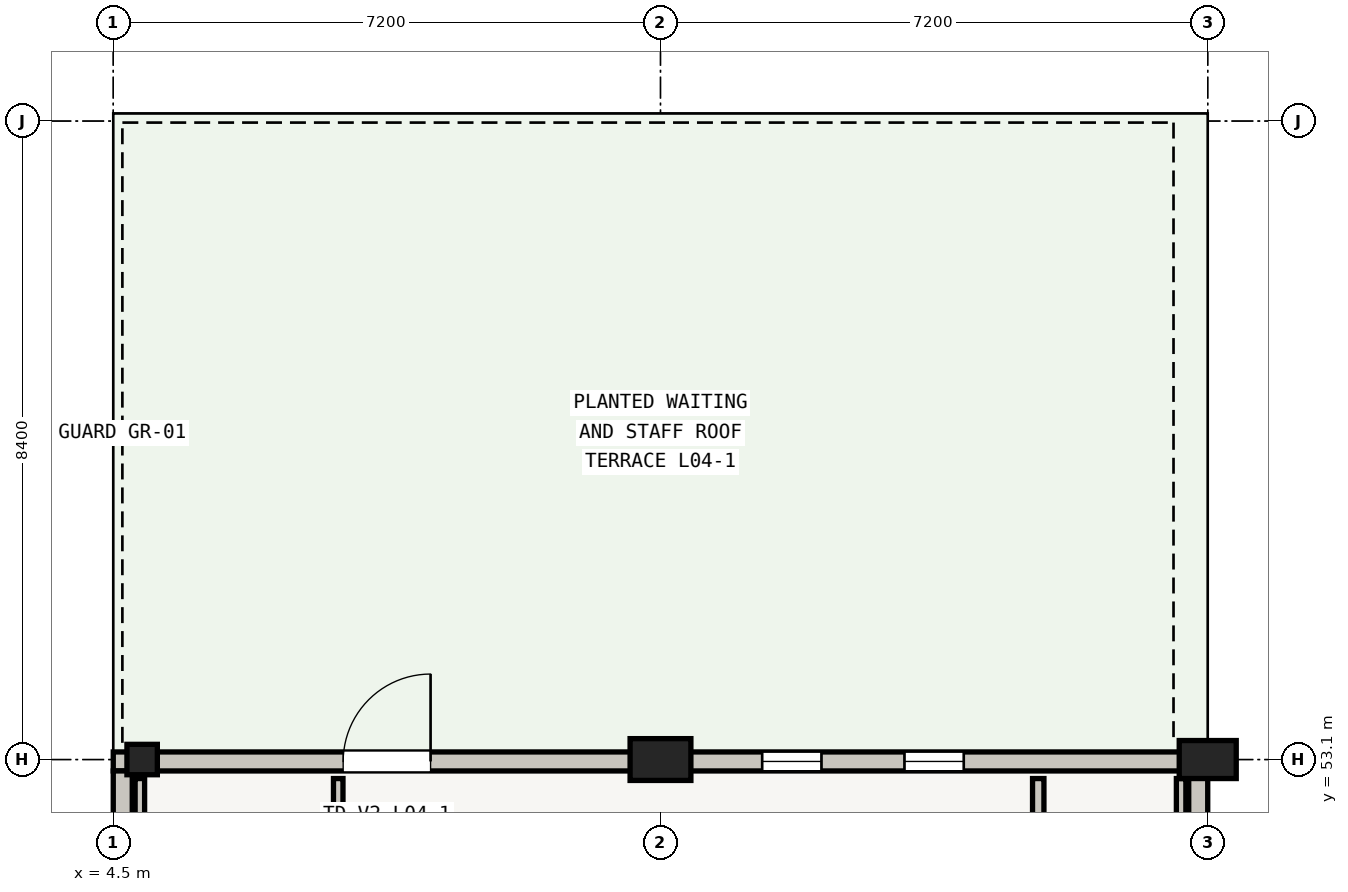
"""IFC4 building model, lengths in metres.
Left out: names, types, materials, properties, quantities, classifications, styles, units other than length and angle.
Written with IfcOpenShell. Run it as: python <this file> out.ifc"""

import sys

from ifc_helpers import new_model, si_unit, direction, frame, frame_2d, origin, origin_2d, place, context, subcontext, project, spatial, rectangle, extrude, element, fill, save


model = new_model("IFC4")
c1 = context("Model", 3, precision=1e-05, world=origin(), true_north=direction((0.0, 1.0)))
c2 = subcontext(c1, "Body", "Model", "MODEL_VIEW")
j1 = project(units=[si_unit("LENGTHUNIT", "METRE"), si_unit("PLANEANGLEUNIT", "RADIAN")], contexts=[c1])
p1 = place(None, origin())
s1 = spatial("IfcSite", under=j1, at=p1, CompositionType="ELEMENT")
p2 = place(p1, origin())
s2 = spatial("IfcBuilding", under=s1, at=p2, CompositionType="ELEMENT")
p3 = place(p2, frame((0.0, 0.0, 17.1)))
s3 = spatial("IfcBuildingStorey", under=s2, at=p3, CompositionType="ELEMENT", Elevation=17.1)
p4 = place(p3, frame((4.88, 53.1, 0.0), z_axis=(0.0, 0.0, 1.0), x_axis=(1.0, 0.0, 0.0)))
e1 = element("IfcColumn", 1, at=p4, inside=s3, PredefinedType="COLUMN", context=c2, shape_type="SweptSolid", body=[
    extrude(rectangle(XDim=0.4, YDim=0.4, at=origin_2d()), origin(), (0.0, 0.0, 1.0), 3.77),
])
p5 = place(p3, frame((11.7, 53.1, 0.0), z_axis=(0.0, 0.0, 1.0), x_axis=(1.0, 0.0, 0.0)))
e2 = element("IfcColumn", 2, at=p5, inside=s3, PredefinedType="COLUMN", context=c2, shape_type="SweptSolid", body=[
    extrude(rectangle(XDim=0.8, YDim=0.55, at=origin_2d()), origin(), (0.0, 0.0, 1.0), 3.77),
])
p6 = place(p3, frame((18.9, 53.1, 0.0), z_axis=(0.0, 0.0, 1.0), x_axis=(1.0, 0.0, 0.0)))
e3 = element("IfcColumn", 3, at=p6, inside=s3, PredefinedType="COLUMN", context=c2, shape_type="SweptSolid", body=[
    extrude(rectangle(XDim=0.75, YDim=0.5, at=origin_2d()), origin(), (0.0, 0.0, 1.0), 3.77),
])
p7 = place(p3, frame((4.5, 53.075, 0.0), z_axis=(0.0, 0.0, 1.0), x_axis=(1.0, 0.0, 0.0)))
e4 = element("IfcWall", 4, at=p7, inside=s3, PredefinedType="STANDARD", context=c2, shape_type="SweptSolid", body=[
    extrude(rectangle(XDim=7.2, YDim=0.25, at=frame_2d((3.6, 0.0))), origin(), (0.0, 0.0, 1.0), 2.955),
])
p8 = place(p7, frame((3.025, 0.0, 0.19)))
e5 = element("IfcOpeningElement", 5, at=p8, cuts=e4, PredefinedType="OPENING", context=c2, shape_type="SweptSolid", body=[
    extrude(rectangle(XDim=1.15, YDim=2.02, at=frame_2d((0.575, 1.01))), frame((0.0, 0.125, 0.0), z_axis=(0.0, -1.0, 0.0), x_axis=(1.0, 0.0, 0.0)), (0.0, 0.0, 1.0), 0.25),
])
p9 = place(p3, frame((11.7, 53.075, 0.0), z_axis=(0.0, 0.0, 1.0), x_axis=(1.0, 0.0, 0.0)))
e6 = element("IfcWall", 6, at=p9, inside=s3, PredefinedType="STANDARD", context=c2, shape_type="SweptSolid", body=[
    extrude(rectangle(XDim=7.2, YDim=0.25, at=frame_2d((3.6, 0.0))), origin(), (0.0, 0.0, 1.0), 2.955),
])
p10 = place(p9, frame((1.338, 0.0, 0.6)))
e7 = element("IfcOpeningElement", 7, at=p10, cuts=e6, PredefinedType="OPENING", context=c2, shape_type="SweptSolid", body=[
    extrude(rectangle(XDim=0.78, YDim=1.95, at=frame_2d((0.39, 0.975))), frame((0.0, 0.125, 0.0), z_axis=(0.0, -1.0, 0.0), x_axis=(1.0, 0.0, 0.0)), (0.0, 0.0, 1.0), 0.25),
])
p11 = place(p9, frame((3.21, 0.0, 0.6)))
e8 = element("IfcOpeningElement", 8, at=p11, cuts=e6, PredefinedType="OPENING", context=c2, shape_type="SweptSolid", body=[
    extrude(rectangle(XDim=0.78, YDim=1.95, at=frame_2d((0.39, 0.975))), frame((0.0, 0.125, 0.0), z_axis=(0.0, -1.0, 0.0), x_axis=(1.0, 0.0, 0.0)), (0.0, 0.0, 1.0), 0.25),
])
p12 = place(p3, frame((18.775, 52.95, 0.0), z_axis=(0.0, 0.0, 1.0), x_axis=(0.0, -1.0, 0.0)))
e9 = element("IfcWall", 9, at=p12, inside=s3, PredefinedType="STANDARD", context=c2, shape_type="SweptSolid", body=[
    extrude(rectangle(XDim=8.25, YDim=0.25, at=frame_2d((4.125, 0.0))), origin(), (0.0, 0.0, 1.0), 2.955),
])
p13 = place(p3, frame((4.625, 44.7, 0.0), z_axis=(0.0, 0.0, 1.0), x_axis=(0.0, 1.0, 0.0)))
e10 = element("IfcWall", 10, at=p13, inside=s3, PredefinedType="STANDARD", context=c2, shape_type="SweptSolid", body=[
    extrude(rectangle(XDim=8.25, YDim=0.25, at=frame_2d((4.125, 0.0))), origin(), (0.0, 0.0, 1.0), 3.155),
])
p14 = place(p3, frame((16.67, 15.92, 0.0), z_axis=(0.0, 0.0, 1.0), x_axis=(0.0, 1.0, 0.0)))
e11 = element("IfcWall", 11, at=p14, inside=s3, PredefinedType="PARTITIONING", context=c2, shape_type="SweptSolid", body=[
    extrude(rectangle(XDim=36.93, YDim=0.15, at=frame_2d((18.465, 0.0))), origin(), (0.0, 0.0, 1.0), 2.79),
])
p15 = place(p14, frame((17.945, 0.0, 0.0)))
e12 = element("IfcOpeningElement", 12, at=p15, cuts=e11, PredefinedType="OPENING", context=c2, shape_type="SweptSolid", body=[
    extrude(rectangle(XDim=1.04, YDim=2.05, at=frame_2d((0.52, 1.025))), frame((0.0, 0.075, 0.0), z_axis=(0.0, -1.0, 0.0), x_axis=(1.0, 0.0, 0.0)), (0.0, 0.0, 1.0), 0.15),
])
p16 = place(p3, frame((18.55, 52.85, 0.0), z_axis=(0.0, 0.0, 1.0), x_axis=(0.0, -1.0, 0.0)))
e13 = element("IfcWall", 13, at=p16, inside=s3, PredefinedType="PARTITIONING", context=c2, shape_type="SweptSolid", body=[
    extrude(rectangle(XDim=33.95, YDim=0.125, at=frame_2d((16.975, 0.0))), origin(), (0.0, 0.0, 1.0), 2.79),
])
p17 = place(p3, frame((7.46, 52.85, 0.0), z_axis=(0.0, 0.0, 1.0), x_axis=(0.0, -1.0, 0.0)))
e14 = element("IfcWall", 14, at=p17, inside=s3, PredefinedType="PARTITIONING", context=c2, shape_type="SweptSolid", body=[
    extrude(rectangle(XDim=27.0, YDim=0.125, at=frame_2d((13.5, 0.0))), origin(), (0.0, 0.0, 1.0), 2.79),
])
p18 = place(p3, frame((4.85, 15.92, 0.0), z_axis=(0.0, 0.0, 1.0), x_axis=(0.0, 1.0, 0.0)))
e15 = element("IfcWall", 15, at=p18, inside=s3, PredefinedType="PARTITIONING", context=c2, shape_type="SweptSolid", body=[
    extrude(rectangle(XDim=36.93, YDim=0.125, at=frame_2d((18.465, 0.0))), origin(), (0.0, 0.0, 1.0), 2.79),
])
p19 = place(p8, origin())
e16 = element("IfcDoor", 16, at=p19, inside=s3, OperationType="SINGLE_SWING_RIGHT", PredefinedType="DOOR", context=c2, shape_type="SweptSolid", body=[
    extrude(rectangle(XDim=1.15, YDim=2.02, at=frame_2d((0.575, 1.01))), frame((0.0, 0.025, 0.0), z_axis=(0.0, -1.0, 0.0), x_axis=(1.0, 0.0, 0.0)), (0.0, 0.0, 1.0), 0.05),
])
fill(e5, e16)
p20 = place(p10, origin())
e17 = element("IfcWindow", 17, at=p20, inside=s3, PartitioningType="SINGLE_PANEL", PredefinedType="WINDOW", context=c2, shape_type="SweptSolid", body=[
    extrude(rectangle(XDim=0.78, YDim=1.95, at=frame_2d((0.39, 0.975))), frame((0.0, 0.03, 0.0), z_axis=(0.0, -1.0, 0.0), x_axis=(1.0, 0.0, 0.0)), (0.0, 0.0, 1.0), 0.06),
])
fill(e7, e17)
p21 = place(p11, origin())
e18 = element("IfcWindow", 18, at=p21, inside=s3, PartitioningType="SINGLE_PANEL", PredefinedType="WINDOW", context=c2, shape_type="SweptSolid", body=[
    extrude(rectangle(XDim=0.78, YDim=1.95, at=frame_2d((0.39, 0.975))), frame((0.0, 0.03, 0.0), z_axis=(0.0, -1.0, 0.0), x_axis=(1.0, 0.0, 0.0)), (0.0, 0.0, 1.0), 0.06),
])
fill(e8, e18)
save(model, sys.argv[1])
